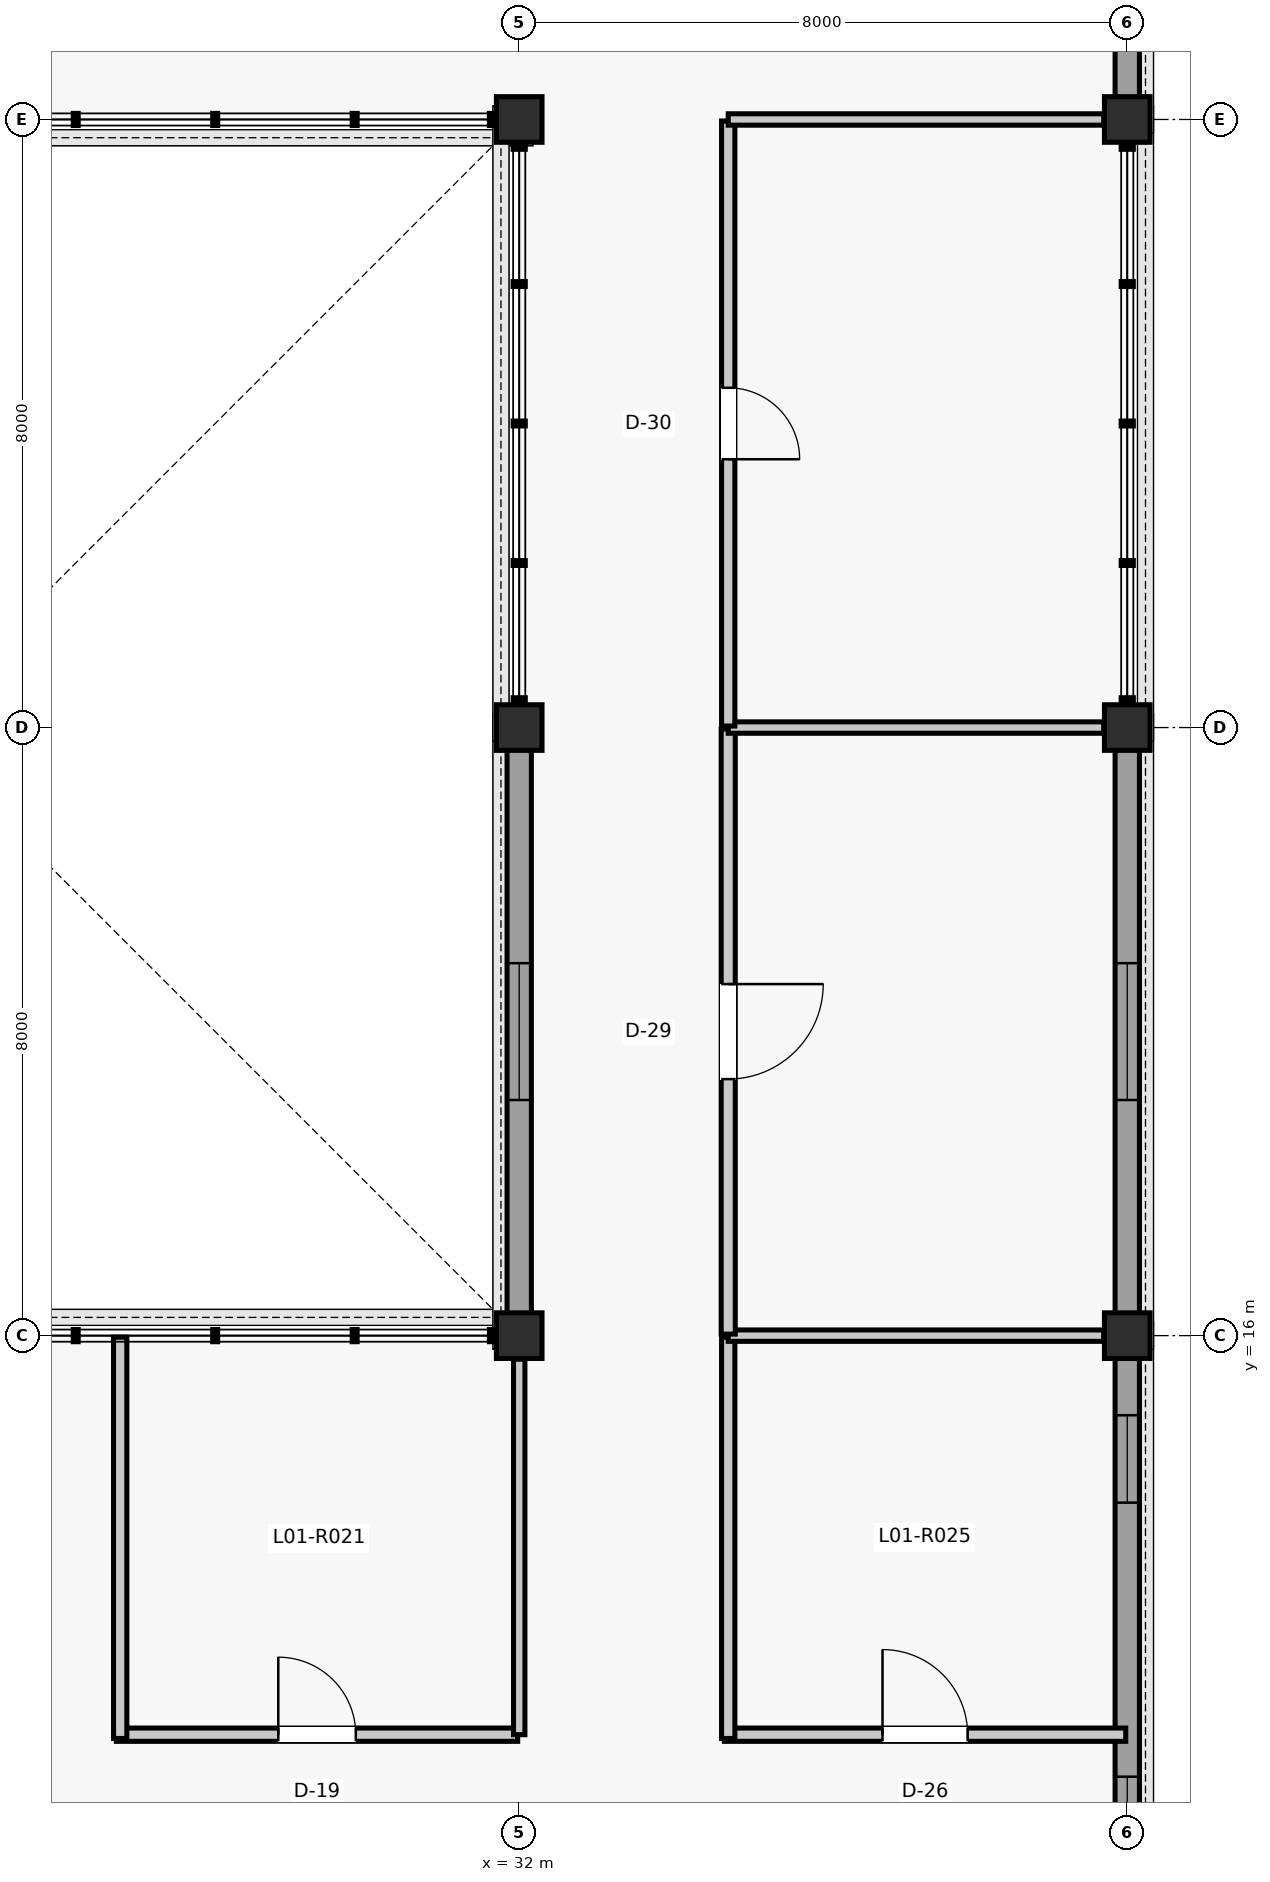
"""IFC4 building model, lengths in metres.
Left out: names, types, materials, properties, quantities, classifications, styles, units other than length and angle.
Written with IfcOpenShell. Run it as: python <this file> out.ifc"""

import sys

from ifc_helpers import new_model, si_unit, direction, frame, frame_2d, origin, origin_2d, place, context, subcontext, project, spatial, rectangle, extrude, element, fill, save


model = new_model("IFC4")
c1 = context("Model", 3, precision=1e-05, world=origin(), true_north=direction((0.0, 1.0)))
c2 = subcontext(c1, "Body", "Model", "MODEL_VIEW")
j1 = project(units=[si_unit("LENGTHUNIT", "METRE"), si_unit("PLANEANGLEUNIT", "RADIAN")], contexts=[c1])
p1 = place(None, origin())
s1 = spatial("IfcSite", under=j1, at=p1, CompositionType="ELEMENT")
p2 = place(p1, origin())
s2 = spatial("IfcBuilding", under=s1, at=p2, CompositionType="ELEMENT")
p3 = place(p2, frame((0.0, 0.0, 5.28)))
s3 = spatial("IfcBuildingStorey", under=s2, at=p3, CompositionType="ELEMENT", Elevation=5.28)
for number, where, z_axis, x_axis in (
    (1, (32.0, 16.0, 0.0), (0.0, 0.0, 1.0), (1.0, 0.0, 0.0)),
    (2, (32.0, 24.0, 0.0), (0.0, 0.0, 1.0), (1.0, 0.0, 0.0)),
    (3, (32.0, 32.0, 0.0), (0.0, 0.0, 1.0), (1.0, 0.0, 0.0)),
    (4, (40.0, 16.0, 0.0), (0.0, 0.0, 1.0), (1.0, 0.0, 0.0)),
    (5, (40.0, 24.0, 0.0), (0.0, 0.0, 1.0), (1.0, 0.0, 0.0)),
    (6, (40.0, 32.0, 0.0), (0.0, 0.0, 1.0), (1.0, 0.0, 0.0)),
):
    element("IfcColumn", number, at=place(p3, frame(where, z_axis=z_axis, x_axis=x_axis)), inside=s3, PredefinedType="COLUMN", context=c2, shape_type="SweptSolid", body=[
        extrude(rectangle(XDim=0.6, YDim=0.6, at=origin_2d()), origin(), (0.0, 0.0, 1.0), 4.62),
    ])
p4 = place(p3, frame((40.0, 8.285, 0.0), z_axis=(0.0, 0.0, 1.0), x_axis=(0.0, 1.0, 0.0)))
e7 = element("IfcWall", 7, at=p4, inside=s3, PredefinedType="SOLIDWALL", context=c2, shape_type="SweptSolid", body=[
    extrude(rectangle(XDim=7.43, YDim=0.32, at=frame_2d((3.715, 0.0))), origin(), (0.0, 0.0, 1.0), 3.977),
])
p5 = place(p4, frame((0.762, 0.0, 0.95)))
e8 = element("IfcOpeningElement", 8, at=p5, cuts=e7, PredefinedType="OPENING", context=c2, shape_type="SweptSolid", body=[
    extrude(rectangle(XDim=1.15, YDim=1.65, at=frame_2d((0.575, 0.825))), frame((0.0, 0.17, 0.0), z_axis=(0.0, -1.0, 0.0), x_axis=(1.0, 0.0, 0.0)), (0.0, 0.0, 1.0), 0.34),
])
p6 = place(p4, frame((5.518, 0.0, 0.95)))
e9 = element("IfcOpeningElement", 9, at=p6, cuts=e7, PredefinedType="OPENING", context=c2, shape_type="SweptSolid", body=[
    extrude(rectangle(XDim=1.15, YDim=1.65, at=frame_2d((0.575, 0.825))), frame((0.0, 0.17, 0.0), z_axis=(0.0, -1.0, 0.0), x_axis=(1.0, 0.0, 0.0)), (0.0, 0.0, 1.0), 0.34),
])
p7 = place(p3, frame((32.0, 16.285, 0.0), z_axis=(0.0, 0.0, 1.0), x_axis=(0.0, 1.0, 0.0)))
e10 = element("IfcWall", 10, at=p7, inside=s3, PredefinedType="SOLIDWALL", context=c2, shape_type="SweptSolid", body=[
    extrude(rectangle(XDim=7.43, YDim=0.32, at=frame_2d((3.715, 0.0))), origin(), (0.0, 0.0, 1.0), 3.977),
])
p8 = place(p7, frame((2.815, 0.0, 0.9)))
e11 = element("IfcOpeningElement", 11, at=p8, cuts=e10, PredefinedType="OPENING", context=c2, shape_type="SweptSolid", body=[
    extrude(rectangle(XDim=1.8, YDim=2.3, at=frame_2d((0.9, 1.15))), frame((0.0, 0.17, 0.0), z_axis=(0.0, -1.0, 0.0), x_axis=(1.0, 0.0, 0.0)), (0.0, 0.0, 1.0), 0.34),
])
p9 = place(p3, frame((40.0, 16.285, 0.0), z_axis=(0.0, 0.0, 1.0), x_axis=(0.0, 1.0, 0.0)))
e12 = element("IfcWall", 12, at=p9, inside=s3, PredefinedType="SOLIDWALL", context=c2, shape_type="SweptSolid", body=[
    extrude(rectangle(XDim=7.43, YDim=0.32, at=frame_2d((3.715, 0.0))), origin(), (0.0, 0.0, 1.0), 3.91),
])
p10 = place(p9, frame((2.815, 0.0, 0.9)))
e13 = element("IfcOpeningElement", 13, at=p10, cuts=e12, PredefinedType="OPENING", context=c2, shape_type="SweptSolid", body=[
    extrude(rectangle(XDim=1.8, YDim=2.3, at=frame_2d((0.9, 1.15))), frame((0.0, 0.17, 0.0), z_axis=(0.0, -1.0, 0.0), x_axis=(1.0, 0.0, 0.0)), (0.0, 0.0, 1.0), 0.34),
])
p11 = place(p3, frame((40.0, 32.285, 0.0), z_axis=(0.0, 0.0, 1.0), x_axis=(0.0, 1.0, 0.0)))
e14 = element("IfcWall", 14, at=p11, inside=s3, PredefinedType="SOLIDWALL", context=c2, shape_type="SweptSolid", body=[
    extrude(rectangle(XDim=7.43, YDim=0.32, at=frame_2d((3.715, 0.0))), origin(), (0.0, 0.0, 1.0), 3.914),
])
p12 = place(p11, frame((0.698, 0.0, 0.95)))
e15 = element("IfcOpeningElement", 15, at=p12, cuts=e14, PredefinedType="OPENING", context=c2, shape_type="SweptSolid", body=[
    extrude(rectangle(XDim=1.28, YDim=1.72, at=frame_2d((0.64, 0.86))), frame((0.0, 0.17, 0.0), z_axis=(0.0, -1.0, 0.0), x_axis=(1.0, 0.0, 0.0)), (0.0, 0.0, 1.0), 0.34),
])
p13 = place(p11, frame((5.453, 0.0, 0.95)))
e16 = element("IfcOpeningElement", 16, at=p13, cuts=e14, PredefinedType="OPENING", context=c2, shape_type="SweptSolid", body=[
    extrude(rectangle(XDim=1.28, YDim=1.72, at=frame_2d((0.64, 0.86))), frame((0.0, 0.17, 0.0), z_axis=(0.0, -1.0, 0.0), x_axis=(1.0, 0.0, 0.0)), (0.0, 0.0, 1.0), 0.34),
])
p14 = place(p3, frame((26.7, 10.75, 0.0), z_axis=(0.0, 0.0, 1.0), x_axis=(1.0, 0.0, 0.0)))
e17 = element("IfcWall", 17, at=p14, inside=s3, PredefinedType="PARTITIONING", context=c2, shape_type="SweptSolid", body=[
    extrude(rectangle(XDim=5.28, YDim=0.175, at=frame_2d((2.64, 0.0))), origin(), (0.0, 0.0, 1.0), 3.857),
])
p15 = place(p14, frame((2.13, 0.0, 0.0)))
e18 = element("IfcOpeningElement", 18, at=p15, cuts=e17, PredefinedType="OPENING", context=c2, shape_type="SweptSolid", body=[
    extrude(rectangle(XDim=1.02, YDim=2.2, at=frame_2d((0.51, 1.1))), frame((0.0, 0.097, 0.0), z_axis=(0.0, -1.0, 0.0), x_axis=(1.0, 0.0, 0.0)), (0.0, 0.0, 1.0), 0.195),
])
p16 = place(p3, frame((26.75, 10.7, 0.0), z_axis=(0.0, 0.0, 1.0), x_axis=(0.0, 1.0, 0.0)))
e19 = element("IfcWall", 19, at=p16, inside=s3, PredefinedType="PARTITIONING", context=c2, shape_type="SweptSolid", body=[
    extrude(rectangle(XDim=5.28, YDim=0.175, at=frame_2d((2.64, 0.0))), origin(), (0.0, 0.0, 1.0), 3.907),
])
p17 = place(p3, frame((32.0, 10.75, 0.0), z_axis=(0.0, 0.0, 1.0), x_axis=(0.0, 1.0, 0.0)))
e20 = element("IfcWall", 20, at=p17, inside=s3, PredefinedType="PARTITIONING", context=c2, shape_type="SweptSolid", body=[
    extrude(rectangle(XDim=4.94, YDim=0.15, at=frame_2d((2.47, 0.0))), origin(), (0.0, 0.0, 1.0), 3.857),
])
p18 = place(p3, frame((34.7, 10.75, 0.0), z_axis=(0.0, 0.0, 1.0), x_axis=(1.0, 0.0, 0.0)))
e21 = element("IfcWall", 21, at=p18, inside=s3, PredefinedType="PARTITIONING", context=c2, shape_type="SweptSolid", body=[
    extrude(rectangle(XDim=5.28, YDim=0.175, at=frame_2d((2.64, 0.0))), origin(), (0.0, 0.0, 1.0), 3.913),
])
p19 = place(p18, frame((2.08, 0.0, 0.0)))
e22 = element("IfcOpeningElement", 22, at=p19, cuts=e21, PredefinedType="OPENING", context=c2, shape_type="SweptSolid", body=[
    extrude(rectangle(XDim=1.12, YDim=2.22, at=frame_2d((0.56, 1.11))), frame((0.0, 0.097, 0.0), z_axis=(0.0, -1.0, 0.0), x_axis=(1.0, 0.0, 0.0)), (0.0, 0.0, 1.0), 0.195),
])
p20 = place(p3, frame((34.75, 10.7, 0.0), z_axis=(0.0, 0.0, 1.0), x_axis=(0.0, 1.0, 0.0)))
e23 = element("IfcWall", 23, at=p20, inside=s3, PredefinedType="PARTITIONING", context=c2, shape_type="SweptSolid", body=[
    extrude(rectangle(XDim=5.28, YDim=0.175, at=frame_2d((2.64, 0.0))), origin(), (0.0, 0.0, 1.0), 3.771),
])
p21 = place(p3, frame((34.75, 16.0, 0.0), z_axis=(0.0, 0.0, 1.0), x_axis=(1.0, 0.0, 0.0)))
e24 = element("IfcWall", 24, at=p21, inside=s3, PredefinedType="PARTITIONING", context=c2, shape_type="SweptSolid", body=[
    extrude(rectangle(XDim=4.94, YDim=0.15, at=frame_2d((2.47, 0.0))), origin(), (0.0, 0.0, 1.0), 3.771),
])
p22 = place(p3, frame((34.75, 16.02, 0.0), z_axis=(0.0, 0.0, 1.0), x_axis=(0.0, 1.0, 0.0)))
e25 = element("IfcWall", 25, at=p22, inside=s3, PredefinedType="PARTITIONING", context=c2, shape_type="SweptSolid", body=[
    extrude(rectangle(XDim=7.96, YDim=0.185, at=frame_2d((3.98, 0.0))), origin(), (0.0, 0.0, 1.0), 3.771),
])
p23 = place(p22, frame((3.355, 0.0, 0.0)))
e26 = element("IfcOpeningElement", 26, at=p23, cuts=e25, PredefinedType="OPENING", context=c2, shape_type="SweptSolid", body=[
    extrude(rectangle(XDim=1.25, YDim=2.18, at=frame_2d((0.625, 1.09))), frame((0.0, 0.103, 0.0), z_axis=(0.0, -1.0, 0.0), x_axis=(1.0, 0.0, 0.0)), (0.0, 0.0, 1.0), 0.205),
])
p24 = place(p3, frame((34.75, 24.0, 0.0), z_axis=(0.0, 0.0, 1.0), x_axis=(1.0, 0.0, 0.0)))
e27 = element("IfcWall", 27, at=p24, inside=s3, PredefinedType="PARTITIONING", context=c2, shape_type="SweptSolid", body=[
    extrude(rectangle(XDim=4.94, YDim=0.15, at=frame_2d((2.47, 0.0))), origin(), (0.0, 0.0, 1.0), 3.781),
])
p25 = place(p3, frame((34.75, 24.02, 0.0), z_axis=(0.0, 0.0, 1.0), x_axis=(0.0, 1.0, 0.0)))
e28 = element("IfcWall", 28, at=p25, inside=s3, PredefinedType="PARTITIONING", context=c2, shape_type="SweptSolid", body=[
    extrude(rectangle(XDim=7.96, YDim=0.175, at=frame_2d((3.98, 0.0))), origin(), (0.0, 0.0, 1.0), 3.712),
])
p26 = place(p25, frame((3.51, 0.0, 0.0)))
e29 = element("IfcOpeningElement", 29, at=p26, cuts=e28, PredefinedType="OPENING", context=c2, shape_type="SweptSolid", body=[
    extrude(rectangle(XDim=0.94, YDim=2.12, at=frame_2d((0.47, 1.06))), frame((0.0, 0.097, 0.0), z_axis=(0.0, -1.0, 0.0), x_axis=(1.0, 0.0, 0.0)), (0.0, 0.0, 1.0), 0.195),
])
p27 = place(p3, frame((34.75, 32.0, 0.0), z_axis=(0.0, 0.0, 1.0), x_axis=(1.0, 0.0, 0.0)))
e30 = element("IfcWall", 30, at=p27, inside=s3, PredefinedType="PARTITIONING", context=c2, shape_type="SweptSolid", body=[
    extrude(rectangle(XDim=4.94, YDim=0.15, at=frame_2d((2.47, 0.0))), origin(), (0.0, 0.0, 1.0), 3.712),
])
p28 = place(p5, origin())
e31 = element("IfcWindow", 31, at=p28, inside=s3, PartitioningType="SINGLE_PANEL", PredefinedType="WINDOW", context=c2, shape_type="SweptSolid", body=[
    extrude(rectangle(XDim=1.15, YDim=1.65, at=frame_2d((0.575, 0.825))), frame((0.0, 0.03, 0.0), z_axis=(0.0, -1.0, 0.0), x_axis=(1.0, 0.0, 0.0)), (0.0, 0.0, 1.0), 0.06),
])
fill(e8, e31)
p29 = place(p6, origin())
e32 = element("IfcWindow", 32, at=p29, inside=s3, PartitioningType="SINGLE_PANEL", PredefinedType="WINDOW", context=c2, shape_type="SweptSolid", body=[
    extrude(rectangle(XDim=1.15, YDim=1.65, at=frame_2d((0.575, 0.825))), frame((0.0, 0.03, 0.0), z_axis=(0.0, -1.0, 0.0), x_axis=(1.0, 0.0, 0.0)), (0.0, 0.0, 1.0), 0.06),
])
fill(e9, e32)
p30 = place(p8, origin())
e33 = element("IfcWindow", 33, at=p30, inside=s3, PartitioningType="SINGLE_PANEL", PredefinedType="WINDOW", context=c2, shape_type="SweptSolid", body=[
    extrude(rectangle(XDim=1.8, YDim=2.3, at=frame_2d((0.9, 1.15))), frame((0.0, 0.03, 0.0), z_axis=(0.0, -1.0, 0.0), x_axis=(1.0, 0.0, 0.0)), (0.0, 0.0, 1.0), 0.06),
])
fill(e11, e33)
p31 = place(p10, origin())
e34 = element("IfcWindow", 34, at=p31, inside=s3, PartitioningType="SINGLE_PANEL", PredefinedType="WINDOW", context=c2, shape_type="SweptSolid", body=[
    extrude(rectangle(XDim=1.8, YDim=2.3, at=frame_2d((0.9, 1.15))), frame((0.0, 0.03, 0.0), z_axis=(0.0, -1.0, 0.0), x_axis=(1.0, 0.0, 0.0)), (0.0, 0.0, 1.0), 0.06),
])
fill(e13, e34)
p32 = place(p15, origin())
e35 = element("IfcDoor", 35, at=p32, inside=s3, OperationType="SINGLE_SWING_LEFT", PredefinedType="DOOR", context=c2, shape_type="SweptSolid", body=[
    extrude(rectangle(XDim=1.02, YDim=2.2, at=frame_2d((0.51, 1.1))), frame((0.0, 0.025, 0.0), z_axis=(0.0, -1.0, 0.0), x_axis=(1.0, 0.0, 0.0)), (0.0, 0.0, 1.0), 0.05),
])
fill(e18, e35)
p33 = place(p19, origin())
e36 = element("IfcDoor", 36, at=p33, inside=s3, OperationType="SINGLE_SWING_LEFT", PredefinedType="DOOR", context=c2, shape_type="SweptSolid", body=[
    extrude(rectangle(XDim=1.12, YDim=2.22, at=frame_2d((0.56, 1.11))), frame((0.0, 0.025, 0.0), z_axis=(0.0, -1.0, 0.0), x_axis=(1.0, 0.0, 0.0)), (0.0, 0.0, 1.0), 0.05),
])
fill(e22, e36)
p34 = place(p23, frame((1.25, 0.0, 0.0), z_axis=(0.0, 0.0, 1.0), x_axis=(-1.0, 0.0, 0.0)))
e37 = element("IfcDoor", 37, at=p34, inside=s3, OperationType="SINGLE_SWING_RIGHT", PredefinedType="DOOR", context=c2, shape_type="SweptSolid", body=[
    extrude(rectangle(XDim=1.25, YDim=2.18, at=frame_2d((0.625, 1.09))), frame((0.0, 0.025, 0.0), z_axis=(0.0, -1.0, 0.0), x_axis=(1.0, 0.0, 0.0)), (0.0, 0.0, 1.0), 0.05),
])
fill(e26, e37)
p35 = place(p26, frame((0.94, 0.0, 0.0), z_axis=(0.0, 0.0, 1.0), x_axis=(-1.0, 0.0, 0.0)))
e38 = element("IfcDoor", 38, at=p35, inside=s3, OperationType="SINGLE_SWING_LEFT", PredefinedType="DOOR", context=c2, shape_type="SweptSolid", body=[
    extrude(rectangle(XDim=0.94, YDim=2.12, at=frame_2d((0.47, 1.06))), frame((0.0, 0.025, 0.0), z_axis=(0.0, -1.0, 0.0), x_axis=(1.0, 0.0, 0.0)), (0.0, 0.0, 1.0), 0.05),
])
fill(e29, e38)
save(model, sys.argv[1])
